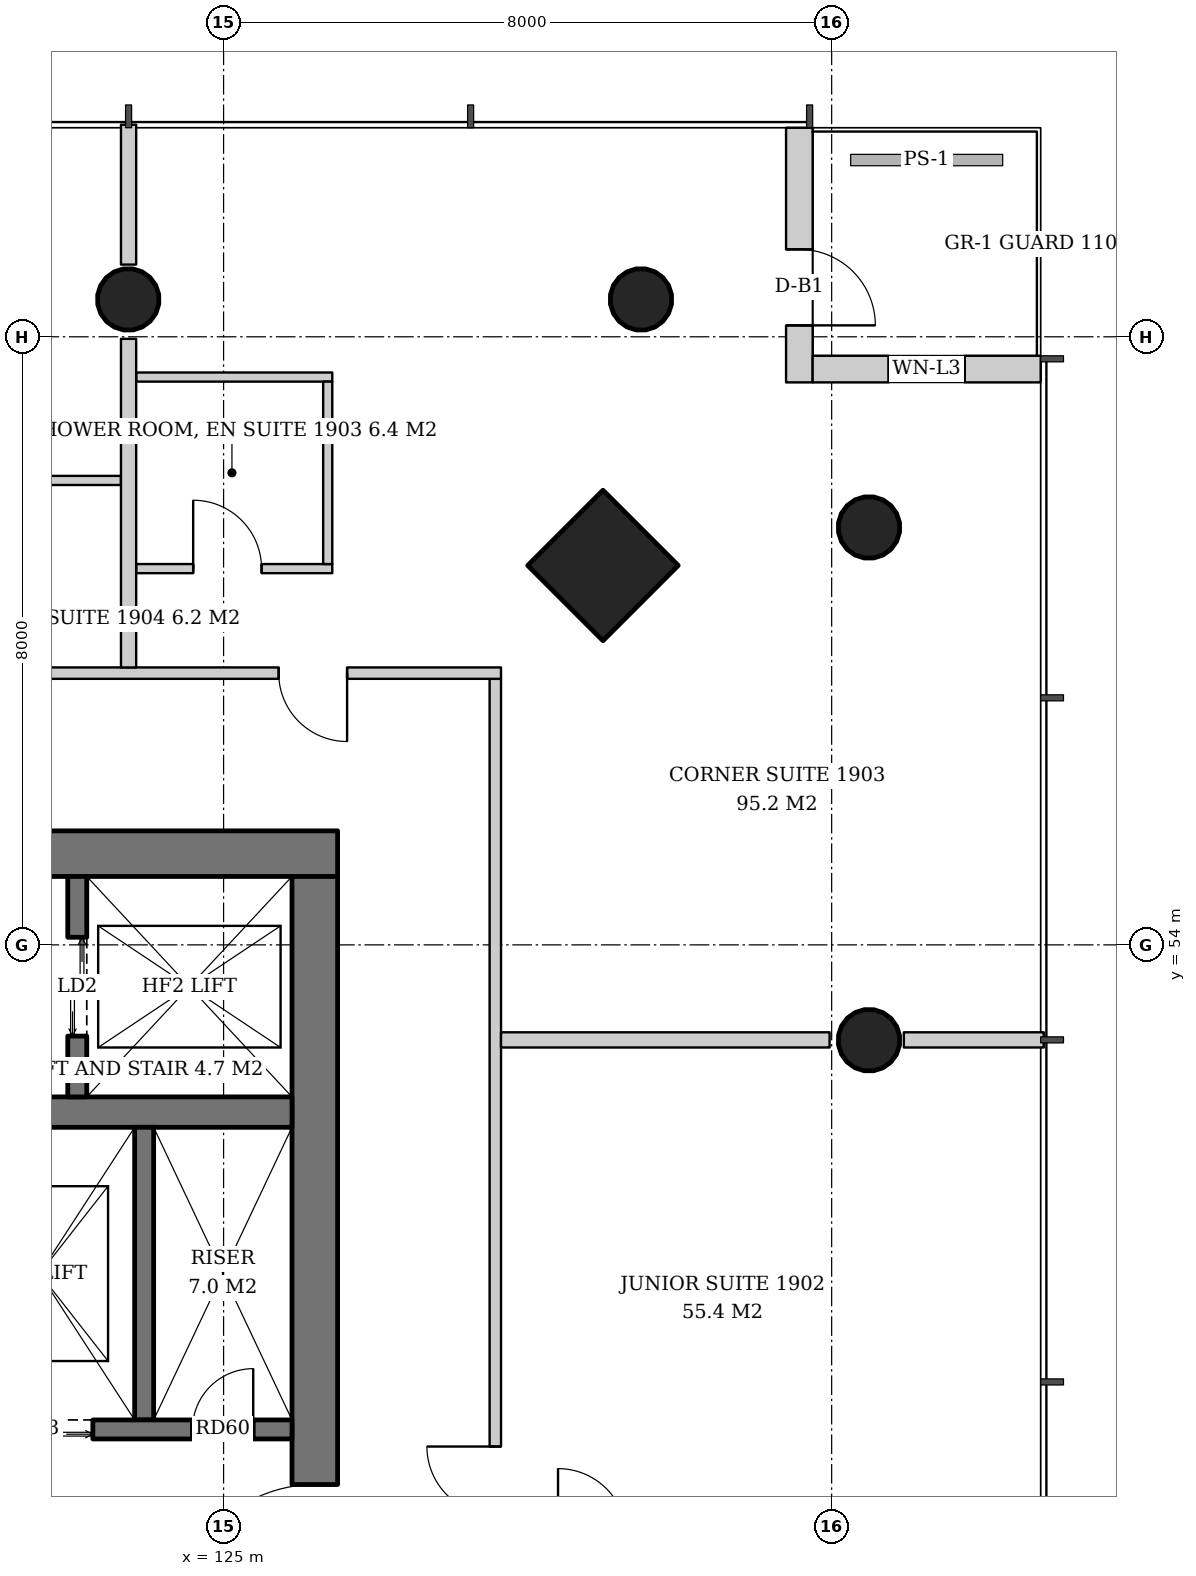
"""IFC4 building model, lengths in metres.
Left out: names, types, materials, properties, quantities, classifications, styles, units other than length and angle.
Written with IfcOpenShell. Run it as: python <this file> out.ifc"""

import sys

from ifc_helpers import new_model, si_unit, direction, frame, frame_2d, origin, origin_2d, place, context, subcontext, project, spatial, rectangle, hollow_circle, extrude, element, fill, save


model = new_model("IFC4")
c1 = context("Model", 3, precision=1e-05, world=origin(), true_north=direction((0.0, 1.0)))
c2 = subcontext(c1, "Body", "Model", "MODEL_VIEW")
j1 = project(units=[si_unit("LENGTHUNIT", "METRE"), si_unit("PLANEANGLEUNIT", "RADIAN")], contexts=[c1])
p1 = place(None, origin())
s1 = spatial("IfcSite", under=j1, at=p1, CompositionType="ELEMENT")
p2 = place(p1, origin())
s2 = spatial("IfcBuilding", under=s1, at=p2, CompositionType="ELEMENT")
p3 = place(p2, frame((0.0, 0.0, 78.0)))
s3 = spatial("IfcBuildingStorey", under=s2, at=p3, CompositionType="ELEMENT", Elevation=78.0)
p4 = place(p3, frame((130.043, 59.043, 0.0), z_axis=(-0.043029647111, -0.043029647111, 0.998146732169), x_axis=(0.707106781187, -0.707106781187, 0.0)))
e1 = element("IfcColumn", 1, at=p4, inside=s3, PredefinedType="COLUMN", context=c2, shape_type="SweptSolid", body=[
    extrude(rectangle(XDim=1.4, YDim=1.4, at=origin_2d()), origin(), (0.0, 0.0, 1.0), 3.807),
])
p5 = place(p3, frame((133.543, 59.543, 0.0), z_axis=(-0.043029647111, -0.043029647111, 0.998146732169), x_axis=(0.707106781187, -0.707106781187, 0.0)))
e2 = element("IfcColumn", 2, at=p5, inside=s3, PredefinedType="COLUMN", context=c2, shape_type="SweptSolid", body=[
    extrude(hollow_circle(Radius=0.406, WallThickness=0.03, at=origin_2d()), origin(), (0.0, 0.0, 1.0), 3.807),
])
p6 = place(p3, frame((133.543, 52.771, 0.0), z_axis=(-0.043059584825, -0.021497706284, 0.998841188968), x_axis=(0.446680166538, -0.894693706707, 0.0)))
e3 = element("IfcColumn", 3, at=p6, inside=s3, PredefinedType="COLUMN", context=c2, shape_type="SweptSolid", body=[
    extrude(hollow_circle(Radius=0.406, WallThickness=0.03, at=origin_2d()), origin(), (0.0, 0.0, 1.0), 3.804),
])
p7 = place(p3, frame((130.543, 62.543, 0.0), z_axis=(-0.043029647111, -0.043029647111, 0.998146732169), x_axis=(0.707106781187, -0.707106781187, 0.0)))
e4 = element("IfcColumn", 4, at=p7, inside=s3, PredefinedType="COLUMN", context=c2, shape_type="SweptSolid", body=[
    extrude(hollow_circle(Radius=0.406, WallThickness=0.03, at=origin_2d()), origin(), (0.0, 0.0, 1.0), 3.807),
])
p8 = place(p3, frame((123.771, 62.543, 0.0), z_axis=(-0.021497706284, -0.043059584825, 0.998841188968), x_axis=(0.894693706707, -0.446680166538, 0.0)))
e5 = element("IfcColumn", 5, at=p8, inside=s3, PredefinedType="COLUMN", context=c2, shape_type="SweptSolid", body=[
    extrude(hollow_circle(Radius=0.406, WallThickness=0.03, at=origin_2d()), origin(), (0.0, 0.0, 1.0), 3.804),
])
p9 = place(p3, frame((107.5, 55.2, 0.0), z_axis=(0.0, 0.0, 1.0), x_axis=(1.0, 0.0, 0.0)))
e6 = element("IfcWall", 6, at=p9, inside=s3, PredefinedType="SHEAR", context=c2, shape_type="SweptSolid", body=[
    extrude(rectangle(XDim=19.0, YDim=0.6, at=frame_2d((9.5, 0.0))), origin(), (0.0, 0.0, 1.0), 3.8),
])
p10 = place(p9, frame((14.14, 0.0, 0.0)))
e7 = element("IfcOpeningElement", 7, at=p10, cuts=e6, PredefinedType="OPENING", context=c2, shape_type="SweptSolid", body=[
    extrude(rectangle(XDim=1.0, YDim=2.1, at=frame_2d((0.5, 1.05))), frame((0.0, 0.31, 0.0), z_axis=(0.0, -1.0, 0.0), x_axis=(1.0, 0.0, 0.0)), (0.0, 0.0, 1.0), 0.62),
])
p11 = place(p9, frame((1.024, 0.0, 0.0)))
e8 = element("IfcOpeningElement", 8, at=p11, cuts=e6, PredefinedType="OPENING", context=c2, shape_type="SweptSolid", body=[
    extrude(rectangle(XDim=1.0, YDim=2.1, at=frame_2d((0.5, 1.05))), frame((0.0, 0.31, 0.0), z_axis=(0.0, -1.0, 0.0), x_axis=(1.0, 0.0, 0.0)), (0.0, 0.0, 1.0), 0.62),
])
p12 = place(p9, frame((3.262, 0.0, 0.0)))
e9 = element("IfcOpeningElement", 9, at=p12, cuts=e6, PredefinedType="OPENING", context=c2, shape_type="SweptSolid", body=[
    extrude(rectangle(XDim=1.0, YDim=2.1, at=frame_2d((0.5, 1.05))), frame((0.0, 0.31, 0.0), z_axis=(0.0, -1.0, 0.0), x_axis=(1.0, 0.0, 0.0)), (0.0, 0.0, 1.0), 0.62),
])
p13 = place(p3, frame((126.2, 37.1, 0.0), z_axis=(0.0, 0.0, 1.0), x_axis=(0.0, 1.0, 0.0)))
e10 = element("IfcWall", 10, at=p13, inside=s3, PredefinedType="SHEAR", context=c2, shape_type="SweptSolid", body=[
    extrude(rectangle(XDim=17.8, YDim=0.6, at=frame_2d((8.9, 0.0))), origin(), (0.0, 0.0, 1.0), 3.8),
])
p14 = place(p13, frame((8.0, 0.0, 0.0)))
e11 = element("IfcOpeningElement", 11, at=p14, cuts=e10, PredefinedType="OPENING", context=c2, shape_type="SweptSolid", body=[
    extrude(rectangle(XDim=1.8, YDim=2.4, at=frame_2d((0.9, 1.2))), frame((0.0, 0.31, 0.0), z_axis=(0.0, -1.0, 0.0), x_axis=(1.0, 0.0, 0.0)), (0.0, 0.0, 1.0), 0.62),
])
p15 = place(p3, frame((108.1, 51.8, 0.0), z_axis=(0.0, 0.0, 1.0), x_axis=(1.0, 0.0, 0.0)))
e12 = element("IfcWall", 12, at=p15, inside=s3, PredefinedType="SHEAR", context=c2, shape_type="SweptSolid", body=[
    extrude(rectangle(XDim=17.8, YDim=0.4, at=frame_2d((8.9, 0.0))), origin(), (0.0, 0.0, 1.0), 3.8),
])
p16 = place(p3, frame((132.575, 64.75, 0.0), z_axis=(0.0, 0.0, 1.0), x_axis=(0.0, -1.0, 0.0)))
e13 = element("IfcWall", 13, at=p16, inside=s3, PredefinedType="SOLIDWALL", context=c2, shape_type="SweptSolid", body=[
    extrude(rectangle(XDim=3.35, YDim=0.35, at=frame_2d((1.675, 0.0))), origin(), (0.0, 0.0, 1.0), 3.52),
])
p17 = place(p16, frame((1.6, 0.0, 0.0)))
e14 = element("IfcOpeningElement", 14, at=p17, cuts=e13, PredefinedType="OPENING", context=c2, shape_type="SweptSolid", body=[
    extrude(rectangle(XDim=1.0, YDim=2.4, at=frame_2d((0.5, 1.2))), frame((0.0, 0.185, 0.0), z_axis=(0.0, -1.0, 0.0), x_axis=(1.0, 0.0, 0.0)), (0.0, 0.0, 1.0), 0.37),
])
p18 = place(p3, frame((132.75, 61.575, 0.0), z_axis=(0.0, 0.0, 1.0), x_axis=(1.0, 0.0, 0.0)))
e15 = element("IfcWall", 15, at=p18, inside=s3, PredefinedType="SOLIDWALL", context=c2, shape_type="SweptSolid", body=[
    extrude(rectangle(XDim=3.0, YDim=0.35, at=frame_2d((1.5, 0.0))), origin(), (0.0, 0.0, 1.0), 3.52),
])
p19 = place(p18, frame((1.0, 0.0, 0.82)))
e16 = element("IfcOpeningElement", 16, at=p19, cuts=e15, PredefinedType="OPENING", context=c2, shape_type="SweptSolid", body=[
    extrude(rectangle(XDim=1.0, YDim=2.4, at=frame_2d((0.5, 1.2))), frame((0.0, 0.185, 0.0), z_axis=(0.0, -1.0, 0.0), x_axis=(1.0, 0.0, 0.0)), (0.0, 0.0, 1.0), 0.37),
])
p20 = place(p3, frame((123.075, 52.0, 0.0), z_axis=(0.0, 0.0, 1.0), x_axis=(0.0, 1.0, 0.0)))
e17 = element("IfcWall", 17, at=p20, inside=s3, PredefinedType="SHEAR", context=c2, shape_type="SweptSolid", body=[
    extrude(rectangle(XDim=2.9, YDim=0.25, at=frame_2d((1.45, 0.0))), origin(), (0.0, 0.0, 1.0), 3.8),
])
p21 = place(p20, frame((0.8, 0.0, 0.0)))
e18 = element("IfcOpeningElement", 18, at=p21, cuts=e17, PredefinedType="OPENING", context=c2, shape_type="SweptSolid", body=[
    extrude(rectangle(XDim=1.3, YDim=2.2, at=frame_2d((0.65, 1.1))), frame((0.0, 0.135, 0.0), z_axis=(0.0, -1.0, 0.0), x_axis=(1.0, 0.0, 0.0)), (0.0, 0.0, 1.0), 0.27),
])
p22 = place(p3, frame((123.955, 47.75, 0.0), z_axis=(0.0, 0.0, 1.0), x_axis=(0.0, 1.0, 0.0)))
e19 = element("IfcWall", 19, at=p22, inside=s3, PredefinedType="SHEAR", context=c2, shape_type="SweptSolid", body=[
    extrude(rectangle(XDim=3.85, YDim=0.25, at=frame_2d((1.925, 0.0))), origin(), (0.0, 0.0, 1.0), 3.8),
])
p23 = place(p3, frame((121.33, 47.625, 0.0), z_axis=(0.0, 0.0, 1.0), x_axis=(1.0, 0.0, 0.0)))
e20 = element("IfcWall", 20, at=p23, inside=s3, PredefinedType="SHEAR", context=c2, shape_type="SweptSolid", body=[
    extrude(rectangle(XDim=4.57, YDim=0.25, at=frame_2d((2.285, 0.0))), origin(), (0.0, 0.0, 1.0), 3.8),
])
p24 = place(p23, frame((0.55, 0.0, 0.0)))
e21 = element("IfcOpeningElement", 21, at=p24, cuts=e20, PredefinedType="OPENING", context=c2, shape_type="SweptSolid", body=[
    extrude(rectangle(XDim=1.4, YDim=2.4, at=frame_2d((0.7, 1.2))), frame((0.0, 0.135, 0.0), z_axis=(0.0, -1.0, 0.0), x_axis=(1.0, 0.0, 0.0)), (0.0, 0.0, 1.0), 0.27),
])
p25 = place(p23, frame((3.26, 0.0, 0.0)))
e22 = element("IfcOpeningElement", 22, at=p25, cuts=e20, PredefinedType="OPENING", context=c2, shape_type="SweptSolid", body=[
    extrude(rectangle(XDim=0.8, YDim=2.0, at=frame_2d((0.4, 1.0))), frame((0.0, 0.135, 0.0), z_axis=(0.0, -1.0, 0.0), x_axis=(1.0, 0.0, 0.0)), (0.0, 0.0, 1.0), 0.27),
])
p26 = place(p3, frame((128.575, 34.35, 0.0), z_axis=(0.0, 0.0, 1.0), x_axis=(0.0, 1.0, 0.0)))
e23 = element("IfcWall", 23, at=p26, inside=s3, PredefinedType="PARTITIONING", context=c2, shape_type="SweptSolid", body=[
    extrude(rectangle(XDim=23.15, YDim=0.15, at=frame_2d((11.575, 0.0))), origin(), (0.0, 0.0, 1.0), 2.72),
])
p27 = place(p26, frame((2.025, 0.0, 0.0)))
e24 = element("IfcOpeningElement", 24, at=p27, cuts=e23, PredefinedType="OPENING", context=c2, shape_type="SweptSolid", body=[
    extrude(rectangle(XDim=0.9, YDim=2.1, at=frame_2d((0.45, 1.05))), frame((0.0, 0.085, 0.0), z_axis=(0.0, -1.0, 0.0), x_axis=(1.0, 0.0, 0.0)), (0.0, 0.0, 1.0), 0.17),
])
p28 = place(p26, frame((12.15, 0.0, 0.0)))
e25 = element("IfcOpeningElement", 25, at=p28, cuts=e23, PredefinedType="OPENING", context=c2, shape_type="SweptSolid", body=[
    extrude(rectangle(XDim=0.9, YDim=2.1, at=frame_2d((0.45, 1.05))), frame((0.0, 0.085, 0.0), z_axis=(0.0, -1.0, 0.0), x_axis=(1.0, 0.0, 0.0)), (0.0, 0.0, 1.0), 0.17),
])
p29 = place(p3, frame((128.65, 52.75, 0.0), z_axis=(0.0, 0.0, 1.0), x_axis=(1.0, 0.0, 0.0)))
e26 = element("IfcWall", 26, at=p29, inside=s3, PredefinedType="PARTITIONING", context=c2, shape_type="SweptSolid", body=[
    extrude(rectangle(XDim=4.323, YDim=0.2, at=frame_2d((2.162, 0.0))), origin(), (0.0, 0.0, 1.0), 3.52),
])
p30 = place(p3, frame((133.95, 52.75, 0.0), z_axis=(0.0, 0.0, 1.0), x_axis=(1.0, 0.0, 0.0)))
e27 = element("IfcWall", 27, at=p30, inside=s3, PredefinedType="PARTITIONING", context=c2, shape_type="SweptSolid", body=[
    extrude(rectangle(XDim=1.84, YDim=0.2, at=frame_2d((0.92, 0.0))), origin(), (0.0, 0.0, 1.0), 3.52),
])
p31 = place(p3, frame((123.85, 58.95, 0.0), z_axis=(0.0, 0.0, 1.0), x_axis=(1.0, 0.0, 0.0)))
e28 = element("IfcWall", 28, at=p31, inside=s3, PredefinedType="PARTITIONING", context=c2, shape_type="SweptSolid", body=[
    extrude(rectangle(XDim=2.58, YDim=0.12, at=frame_2d((1.29, 0.0))), origin(), (0.0, 0.0, 1.0), 2.82),
])
p32 = place(p31, frame((0.75, 0.0, 0.0)))
e29 = element("IfcOpeningElement", 29, at=p32, cuts=e28, PredefinedType="OPENING", context=c2, shape_type="SweptSolid", body=[
    extrude(rectangle(XDim=0.9, YDim=2.1, at=frame_2d((0.45, 1.05))), frame((0.0, 0.07, 0.0), z_axis=(0.0, -1.0, 0.0), x_axis=(1.0, 0.0, 0.0)), (0.0, 0.0, 1.0), 0.14),
])
p33 = place(p3, frame((123.85, 61.47, 0.0), z_axis=(0.0, 0.0, 1.0), x_axis=(1.0, 0.0, 0.0)))
e30 = element("IfcWall", 30, at=p33, inside=s3, PredefinedType="PARTITIONING", context=c2, shape_type="SweptSolid", body=[
    extrude(rectangle(XDim=2.58, YDim=0.12, at=frame_2d((1.29, 0.0))), origin(), (0.0, 0.0, 1.0), 2.82),
])
p34 = place(p3, frame((126.37, 59.01, 0.0), z_axis=(0.0, 0.0, 1.0), x_axis=(0.0, 1.0, 0.0)))
e31 = element("IfcWall", 31, at=p34, inside=s3, PredefinedType="PARTITIONING", context=c2, shape_type="SweptSolid", body=[
    extrude(rectangle(XDim=2.4, YDim=0.12, at=frame_2d((1.2, 0.0))), origin(), (0.0, 0.0, 1.0), 2.82),
])
p35 = place(p3, frame((123.65, 60.11, 0.0), z_axis=(0.0, 0.0, 1.0), x_axis=(-1.0, 0.0, 0.0)))
e32 = element("IfcWall", 32, at=p35, inside=s3, PredefinedType="PARTITIONING", context=c2, shape_type="SweptSolid", body=[
    extrude(rectangle(XDim=2.42, YDim=0.12, at=frame_2d((1.21, 0.0))), origin(), (0.0, 0.0, 1.0), 2.72),
])
p36 = place(p3, frame((128.65, 57.575, 0.0), z_axis=(0.0, 0.0, 1.0), x_axis=(-1.0, 0.0, 0.0)))
e33 = element("IfcWall", 33, at=p36, inside=s3, PredefinedType="PARTITIONING", context=c2, shape_type="SweptSolid", body=[
    extrude(rectangle(XDim=23.15, YDim=0.15, at=frame_2d((11.575, 0.0))), origin(), (0.0, 0.0, 1.0), 2.72),
])
p37 = place(p36, frame((2.025, 0.0, 0.0)))
e34 = element("IfcOpeningElement", 34, at=p37, cuts=e33, PredefinedType="OPENING", context=c2, shape_type="SweptSolid", body=[
    extrude(rectangle(XDim=0.9, YDim=2.1, at=frame_2d((0.45, 1.05))), frame((0.0, 0.085, 0.0), z_axis=(0.0, -1.0, 0.0), x_axis=(1.0, 0.0, 0.0)), (0.0, 0.0, 1.0), 0.17),
])
p38 = place(p36, frame((7.65, 0.0, 0.0)))
e35 = element("IfcOpeningElement", 35, at=p38, cuts=e33, PredefinedType="OPENING", context=c2, shape_type="SweptSolid", body=[
    extrude(rectangle(XDim=0.9, YDim=2.1, at=frame_2d((0.45, 1.05))), frame((0.0, 0.085, 0.0), z_axis=(0.0, -1.0, 0.0), x_axis=(1.0, 0.0, 0.0)), (0.0, 0.0, 1.0), 0.17),
])
p39 = place(p36, frame((14.75, 0.0, 0.0)))
e36 = element("IfcOpeningElement", 36, at=p39, cuts=e33, PredefinedType="OPENING", context=c2, shape_type="SweptSolid", body=[
    extrude(rectangle(XDim=0.9, YDim=2.1, at=frame_2d((0.45, 1.05))), frame((0.0, 0.085, 0.0), z_axis=(0.0, -1.0, 0.0), x_axis=(1.0, 0.0, 0.0)), (0.0, 0.0, 1.0), 0.17),
])
p40 = place(p3, frame((123.75, 57.65, 0.0), z_axis=(0.0, 0.0, 1.0), x_axis=(0.0, 1.0, 0.0)))
e37 = element("IfcWall", 37, at=p40, inside=s3, PredefinedType="PARTITIONING", context=c2, shape_type="SweptSolid", body=[
    extrude(rectangle(XDim=4.323, YDim=0.2, at=frame_2d((2.162, 0.0))), origin(), (0.0, 0.0, 1.0), 3.52),
])
p41 = place(p3, frame((123.75, 62.95, 0.0), z_axis=(0.0, 0.0, 1.0), x_axis=(0.0, 1.0, 0.0)))
e38 = element("IfcWall", 38, at=p41, inside=s3, PredefinedType="PARTITIONING", context=c2, shape_type="SweptSolid", body=[
    extrude(rectangle(XDim=1.84, YDim=0.2, at=frame_2d((0.92, 0.0))), origin(), (0.0, 0.0, 1.0), 3.52),
])
p42 = place(p17, origin())
e39 = element("IfcDoor", 39, at=p42, inside=s3, OperationType="SINGLE_SWING_RIGHT", PredefinedType="DOOR", context=c2, shape_type="SweptSolid", body=[
    extrude(rectangle(XDim=1.0, YDim=2.4, at=frame_2d((0.5, 1.2))), frame((0.0, 0.025, 0.0), z_axis=(0.0, -1.0, 0.0), x_axis=(1.0, 0.0, 0.0)), (0.0, 0.0, 1.0), 0.05),
])
fill(e14, e39)
p43 = place(p19, origin())
e40 = element("IfcWindow", 40, at=p43, inside=s3, PartitioningType="SINGLE_PANEL", PredefinedType="WINDOW", context=c2, shape_type="SweptSolid", body=[
    extrude(rectangle(XDim=1.0, YDim=2.4, at=frame_2d((0.5, 1.2))), frame((0.0, 0.03, 0.0), z_axis=(0.0, -1.0, 0.0), x_axis=(1.0, 0.0, 0.0)), (0.0, 0.0, 1.0), 0.06),
])
fill(e16, e40)
p44 = place(p21, origin())
e41 = element("IfcDoor", 41, at=p44, inside=s3, OperationType="DOUBLE_DOOR_SLIDING", PredefinedType="DOOR", context=c2, shape_type="SweptSolid", body=[
    extrude(rectangle(XDim=1.3, YDim=2.2, at=frame_2d((0.65, 1.1))), frame((0.0, 0.025, 0.0), z_axis=(0.0, -1.0, 0.0), x_axis=(1.0, 0.0, 0.0)), (0.0, 0.0, 1.0), 0.05),
])
fill(e18, e41)
p45 = place(p24, origin())
e42 = element("IfcDoor", 42, at=p45, inside=s3, OperationType="DOUBLE_DOOR_SLIDING", PredefinedType="DOOR", context=c2, shape_type="SweptSolid", body=[
    extrude(rectangle(XDim=1.4, YDim=2.4, at=frame_2d((0.7, 1.2))), frame((0.0, 0.025, 0.0), z_axis=(0.0, -1.0, 0.0), x_axis=(1.0, 0.0, 0.0)), (0.0, 0.0, 1.0), 0.05),
])
fill(e21, e42)
p46 = place(p25, origin())
e43 = element("IfcDoor", 43, at=p46, inside=s3, OperationType="SINGLE_SWING_RIGHT", PredefinedType="DOOR", context=c2, shape_type="SweptSolid", body=[
    extrude(rectangle(XDim=0.8, YDim=2.0, at=frame_2d((0.4, 1.0))), frame((0.0, 0.025, 0.0), z_axis=(0.0, -1.0, 0.0), x_axis=(1.0, 0.0, 0.0)), (0.0, 0.0, 1.0), 0.05),
])
fill(e22, e43)
p47 = place(p14, origin())
e44 = element("IfcDoor", 44, at=p47, inside=s3, OperationType="DOUBLE_DOOR_SINGLE_SWING", PredefinedType="DOOR", context=c2, shape_type="SweptSolid", body=[
    extrude(rectangle(XDim=1.8, YDim=2.4, at=frame_2d((0.9, 1.2))), frame((0.0, 0.025, 0.0), z_axis=(0.0, -1.0, 0.0), x_axis=(1.0, 0.0, 0.0)), (0.0, 0.0, 1.0), 0.05),
])
fill(e11, e44)
p48 = place(p28, origin())
e45 = element("IfcDoor", 45, at=p48, inside=s3, OperationType="SINGLE_SWING_RIGHT", PredefinedType="DOOR", context=c2, shape_type="SweptSolid", body=[
    extrude(rectangle(XDim=0.9, YDim=2.1, at=frame_2d((0.45, 1.05))), frame((0.0, 0.025, 0.0), z_axis=(0.0, -1.0, 0.0), x_axis=(1.0, 0.0, 0.0)), (0.0, 0.0, 1.0), 0.05),
])
fill(e25, e45)
p49 = place(p32, origin())
e46 = element("IfcDoor", 46, at=p49, inside=s3, OperationType="SINGLE_SWING_LEFT", PredefinedType="DOOR", context=c2, shape_type="SweptSolid", body=[
    extrude(rectangle(XDim=0.9, YDim=2.1, at=frame_2d((0.45, 1.05))), frame((0.0, 0.025, 0.0), z_axis=(0.0, -1.0, 0.0), x_axis=(1.0, 0.0, 0.0)), (0.0, 0.0, 1.0), 0.05),
])
fill(e29, e46)
p50 = place(p37, origin())
e47 = element("IfcDoor", 47, at=p50, inside=s3, OperationType="SINGLE_SWING_LEFT", PredefinedType="DOOR", context=c2, shape_type="SweptSolid", body=[
    extrude(rectangle(XDim=0.9, YDim=2.1, at=frame_2d((0.45, 1.05))), frame((0.0, 0.025, 0.0), z_axis=(0.0, -1.0, 0.0), x_axis=(1.0, 0.0, 0.0)), (0.0, 0.0, 1.0), 0.05),
])
fill(e34, e47)
save(model, sys.argv[1])
